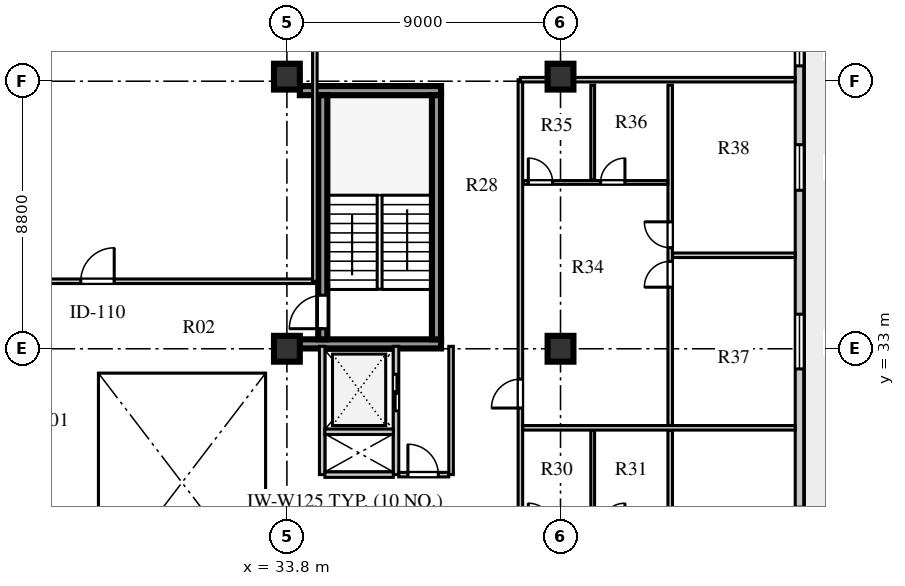
"""IFC4 building model, lengths in metres.
Left out: names, types, materials, properties, quantities, classifications, styles, units other than length and angle.
Written with IfcOpenShell. Run it as: python <this file> out.ifc"""

import sys

from ifc_helpers import new_model, si_unit, direction, frame, frame_2d, origin, origin_2d, place, context, subcontext, project, spatial, rectangle, extrude, element, fill, save


model = new_model("IFC4")
c1 = context("Model", 3, precision=1e-05, world=origin(), true_north=direction((0.0, 1.0)))
c2 = subcontext(c1, "Body", "Model", "MODEL_VIEW")
j1 = project(units=[si_unit("LENGTHUNIT", "METRE"), si_unit("PLANEANGLEUNIT", "RADIAN")], contexts=[c1])
p1 = place(None, origin())
s1 = spatial("IfcSite", under=j1, at=p1, CompositionType="ELEMENT")
p2 = place(p1, origin())
s2 = spatial("IfcBuilding", under=s1, at=p2, CompositionType="ELEMENT")
p3 = place(p2, frame((0.0, 0.0, 237.5)))
s3 = spatial("IfcBuildingStorey", under=s2, at=p3, CompositionType="ELEMENT", Elevation=237.5)
for number, where, z_axis, x_axis in (
    (1, (34.225, 33.16, 0.0), (0.0, 0.0, 1.0), (1.0, 0.0, 0.0)),
    (2, (34.225, 41.49, 0.0), (0.0, 0.0, 1.0), (1.0, 0.0, 0.0)),
):
    element("IfcWall", number, at=place(p3, frame(where, z_axis=z_axis, x_axis=x_axis)), inside=s3, PredefinedType="SHEAR", context=c2, shape_type="SweptSolid", body=[
        extrude(rectangle(XDim=4.645, YDim=0.3, at=frame_2d((2.323, 0.0))), origin(), (0.0, 0.0, 1.0), 3.66),
    ])
p4 = place(p3, frame((34.98, 33.31, 0.0), z_axis=(0.0, 0.0, 1.0), x_axis=(0.0, 1.0, 0.0)))
e3 = element("IfcWall", 3, at=p4, inside=s3, PredefinedType="SHEAR", context=c2, shape_type="SweptSolid", body=[
    extrude(rectangle(XDim=8.03, YDim=0.3, at=frame_2d((4.015, 0.0))), origin(), (0.0, 0.0, 1.0), 3.66),
])
p5 = place(p4, frame((0.35, 0.0, 0.0)))
e4 = element("IfcOpeningElement", 4, at=p5, cuts=e3, PredefinedType="OPENING", context=c2, shape_type="SweptSolid", body=[
    extrude(rectangle(XDim=1.1, YDim=2.1, at=frame_2d((0.55, 1.05))), frame((0.0, 0.16, 0.0), z_axis=(0.0, -1.0, 0.0), x_axis=(1.0, 0.0, 0.0)), (0.0, 0.0, 1.0), 0.32),
])
p6 = place(p3, frame((38.72, 33.31, 0.0), z_axis=(0.0, 0.0, 1.0), x_axis=(0.0, 1.0, 0.0)))
e5 = element("IfcWall", 5, at=p6, inside=s3, PredefinedType="SHEAR", context=c2, shape_type="SweptSolid", body=[
    extrude(rectangle(XDim=8.03, YDim=0.3, at=frame_2d((4.015, 0.0))), origin(), (0.0, 0.0, 1.0), 3.66),
])
for number, where, z_axis, x_axis in (
    (6, (33.8, 33.0, 0.0), (0.0, 0.0, 1.0), (1.0, 0.0, 0.0)),
    (7, (33.8, 41.95, 0.0), (0.0, 0.0, 1.0), (1.0, 0.0, 0.0)),
    (8, (42.8, 33.0, 0.0), (0.0, 0.0, 1.0), (1.0, 0.0, 0.0)),
    (9, (42.8, 41.95, 0.0), (0.0, 0.0, 1.0), (1.0, 0.0, 0.0)),
):
    element("IfcColumn", number, at=place(p3, frame(where, z_axis=z_axis, x_axis=x_axis)), inside=s3, PredefinedType="COLUMN", context=c2, shape_type="SweptSolid", body=[
        extrude(rectangle(XDim=0.85, YDim=0.85, at=origin_2d()), origin(), (0.0, 0.0, 1.0), 3.66),
    ])
p7 = place(p3, frame((50.66, 13.13, 0.0), z_axis=(0.0, 0.0, 1.0), x_axis=(0.0, 1.0, 0.0)))
e10 = element("IfcWall", 10, at=p7, inside=s3, PredefinedType="STANDARD", context=c2, shape_type="SweptSolid", body=[
    extrude(rectangle(XDim=30.94, YDim=0.28, at=frame_2d((15.47, 0.0))), origin(), (0.0, 0.0, 1.0), 3.66),
])
p8 = place(p7, frame((0.67, 0.0, 0.0)))
e11 = element("IfcOpeningElement", 11, at=p8, cuts=e10, PredefinedType="OPENING", context=c2, shape_type="SweptSolid", body=[
    extrude(rectangle(XDim=1.0, YDim=2.05, at=frame_2d((0.5, 1.025))), frame((0.0, 0.15, 0.0), z_axis=(0.0, -1.0, 0.0), x_axis=(1.0, 0.0, 0.0)), (0.0, 0.0, 1.0), 0.3),
])
p9 = place(p7, frame((5.032, 0.0, 0.8)))
e12 = element("IfcOpeningElement", 12, at=p9, cuts=e10, PredefinedType="OPENING", context=c2, shape_type="SweptSolid", body=[
    extrude(rectangle(XDim=1.95, YDim=2.0, at=frame_2d((0.975, 1.0))), frame((0.0, 0.15, 0.0), z_axis=(0.0, -1.0, 0.0), x_axis=(1.0, 0.0, 0.0)), (0.0, 0.0, 1.0), 0.3),
])
p10 = place(p7, frame((12.408, 0.0, 0.8)))
e13 = element("IfcOpeningElement", 13, at=p10, cuts=e10, PredefinedType="OPENING", context=c2, shape_type="SweptSolid", body=[
    extrude(rectangle(XDim=2.25, YDim=2.0, at=frame_2d((1.125, 1.0))), frame((0.0, 0.15, 0.0), z_axis=(0.0, -1.0, 0.0), x_axis=(1.0, 0.0, 0.0)), (0.0, 0.0, 1.0), 0.3),
])
p11 = place(p7, frame((19.207, 0.0, 0.8)))
e14 = element("IfcOpeningElement", 14, at=p11, cuts=e10, PredefinedType="OPENING", context=c2, shape_type="SweptSolid", body=[
    extrude(rectangle(XDim=1.8, YDim=2.0, at=frame_2d((0.9, 1.0))), frame((0.0, 0.15, 0.0), z_axis=(0.0, -1.0, 0.0), x_axis=(1.0, 0.0, 0.0)), (0.0, 0.0, 1.0), 0.3),
])
p12 = place(p7, frame((25.082, 0.0, 0.8)))
e15 = element("IfcOpeningElement", 15, at=p12, cuts=e10, PredefinedType="OPENING", context=c2, shape_type="SweptSolid", body=[
    extrude(rectangle(XDim=1.5, YDim=2.0, at=frame_2d((0.75, 1.0))), frame((0.0, 0.15, 0.0), z_axis=(0.0, -1.0, 0.0), x_axis=(1.0, 0.0, 0.0)), (0.0, 0.0, 1.0), 0.3),
])
p13 = place(p7, frame((29.175, 0.0, 0.8)))
e16 = element("IfcOpeningElement", 16, at=p13, cuts=e10, PredefinedType="OPENING", context=c2, shape_type="SweptSolid", body=[
    extrude(rectangle(XDim=1.2, YDim=1.75, at=frame_2d((0.6, 0.875))), frame((0.0, 0.15, 0.0), z_axis=(0.0, -1.0, 0.0), x_axis=(1.0, 0.0, 0.0)), (0.0, 0.0, 1.0), 0.3),
])
p14 = place(p3, frame((34.96, 28.86, 0.0), z_axis=(0.0, 0.0, 1.0), x_axis=(0.0, 1.0, 0.0)))
e17 = element("IfcWall", 17, at=p14, inside=s3, PredefinedType="SOLIDWALL", context=c2, shape_type="SweptSolid", body=[
    extrude(rectangle(XDim=4.22, YDim=0.18, at=frame_2d((2.11, 0.0))), origin(), (0.0, 0.0, 1.0), 3.66),
])
p15 = place(p3, frame((37.39, 28.86, 0.0), z_axis=(0.0, 0.0, 1.0), x_axis=(0.0, 1.0, 0.0)))
e18 = element("IfcWall", 18, at=p15, inside=s3, PredefinedType="SOLIDWALL", context=c2, shape_type="SweptSolid", body=[
    extrude(rectangle(XDim=4.22, YDim=0.18, at=frame_2d((2.11, 0.0))), origin(), (0.0, 0.0, 1.0), 3.66),
])
p16 = place(p15, frame((2.1, 0.0, 0.0)))
e19 = element("IfcOpeningElement", 19, at=p16, cuts=e18, PredefinedType="OPENING", context=c2, shape_type="SweptSolid", body=[
    extrude(rectangle(XDim=1.2, YDim=2.12, at=frame_2d((0.6, 1.06))), frame((0.0, 0.1, 0.0), z_axis=(0.0, -1.0, 0.0), x_axis=(1.0, 0.0, 0.0)), (0.0, 0.0, 1.0), 0.2),
])
for number, where, z_axis, x_axis in (
    (20, (35.05, 28.86, 0.0), (0.0, 0.0, 1.0), (1.0, 0.0, 0.0)),
    (21, (35.05, 30.27, 0.0), (0.0, 0.0, 1.0), (1.0, 0.0, 0.0)),
):
    element("IfcWall", number, at=place(p3, frame(where, z_axis=z_axis, x_axis=x_axis)), inside=s3, PredefinedType="SOLIDWALL", context=c2, shape_type="SweptSolid", body=[
        extrude(rectangle(XDim=2.25, YDim=0.18, at=frame_2d((1.125, 0.0))), origin(), (0.0, 0.0, 1.0), 3.66),
    ])
p17 = place(p3, frame((39.2, 28.86, 0.0), z_axis=(0.0, 0.0, 1.0), x_axis=(0.0, 1.0, 0.0)))
e22 = element("IfcWall", 22, at=p17, inside=s3, PredefinedType="PARTITIONING", context=c2, shape_type="SweptSolid", body=[
    extrude(rectangle(XDim=4.22, YDim=0.15, at=frame_2d((2.11, 0.0))), origin(), (0.0, 0.0, 1.0), 3.66),
])
p18 = place(p3, frame((37.48, 28.86, 0.0), z_axis=(0.0, 0.0, 1.0), x_axis=(1.0, 0.0, 0.0)))
e23 = element("IfcWall", 23, at=p18, inside=s3, PredefinedType="PARTITIONING", context=c2, shape_type="SweptSolid", body=[
    extrude(rectangle(XDim=1.64, YDim=0.15, at=frame_2d((0.82, 0.0))), origin(), (0.0, 0.0, 1.0), 3.66),
])
p19 = place(p18, frame((0.3, 0.0, 0.0)))
e24 = element("IfcOpeningElement", 24, at=p19, cuts=e23, PredefinedType="OPENING", context=c2, shape_type="SweptSolid", body=[
    extrude(rectangle(XDim=1.0, YDim=2.1, at=frame_2d((0.5, 1.05))), frame((0.0, 0.085, 0.0), z_axis=(0.0, -1.0, 0.0), x_axis=(1.0, 0.0, 0.0)), (0.0, 0.0, 1.0), 0.17),
])
p20 = place(p3, frame((25.22, 35.22, 0.0), z_axis=(0.0, 0.0, 1.0), x_axis=(1.0, 0.0, 0.0)))
e25 = element("IfcWall", 25, at=p20, inside=s3, PredefinedType="PARTITIONING", context=c2, shape_type="SweptSolid", body=[
    extrude(rectangle(XDim=9.5, YDim=0.15, at=frame_2d((4.75, 0.0))), origin(), (0.0, 0.0, 1.0), 3.66),
])
p21 = place(p20, frame((1.8, 0.0, 0.0)))
e26 = element("IfcOpeningElement", 26, at=p21, cuts=e25, PredefinedType="OPENING", context=c2, shape_type="SweptSolid", body=[
    extrude(rectangle(XDim=1.1, YDim=2.08, at=frame_2d((0.55, 1.04))), frame((0.0, 0.085, 0.0), z_axis=(0.0, -1.0, 0.0), x_axis=(1.0, 0.0, 0.0)), (0.0, 0.0, 1.0), 0.17),
])
p22 = place(p3, frame((34.72, 35.22, 0.0), z_axis=(0.0, 0.0, 1.0), x_axis=(0.0, 1.0, 0.0)))
e27 = element("IfcWall", 27, at=p22, inside=s3, PredefinedType="PARTITIONING", context=c2, shape_type="SweptSolid", body=[
    extrude(rectangle(XDim=14.1, YDim=0.15, at=frame_2d((7.05, 0.0))), origin(), (0.0, 0.0, 1.0), 3.66),
])
p23 = place(p3, frame((41.48, 15.35, 0.0), z_axis=(0.0, 0.0, 1.0), x_axis=(0.0, 1.0, 0.0)))
e28 = element("IfcWall", 28, at=p23, inside=s3, PredefinedType="PARTITIONING", context=c2, shape_type="SweptSolid", body=[
    extrude(rectangle(XDim=26.5, YDim=0.15, at=frame_2d((13.25, 0.0))), origin(), (0.0, 0.0, 1.0), 3.66),
])
p24 = place(p23, frame((0.75, 0.0, 0.0)))
e29 = element("IfcOpeningElement", 29, at=p24, cuts=e28, PredefinedType="OPENING", context=c2, shape_type="SweptSolid", body=[
    extrude(rectangle(XDim=0.95, YDim=2.1, at=frame_2d((0.475, 1.05))), frame((0.0, 0.085, 0.0), z_axis=(0.0, -1.0, 0.0), x_axis=(1.0, 0.0, 0.0)), (0.0, 0.0, 1.0), 0.17),
])
p25 = place(p23, frame((15.7, 0.0, 0.0)))
e30 = element("IfcOpeningElement", 30, at=p25, cuts=e28, PredefinedType="OPENING", context=c2, shape_type="SweptSolid", body=[
    extrude(rectangle(XDim=0.95, YDim=2.1, at=frame_2d((0.475, 1.05))), frame((0.0, 0.085, 0.0), z_axis=(0.0, -1.0, 0.0), x_axis=(1.0, 0.0, 0.0)), (0.0, 0.0, 1.0), 0.17),
])
p26 = place(p3, frame((41.48, 41.85, 0.0), z_axis=(0.0, 0.0, 1.0), x_axis=(1.0, 0.0, 0.0)))
e31 = element("IfcWall", 31, at=p26, inside=s3, PredefinedType="PARTITIONING", context=c2, shape_type="SweptSolid", body=[
    extrude(rectangle(XDim=9.04, YDim=0.15, at=frame_2d((4.52, 0.0))), origin(), (0.0, 0.0, 1.0), 3.06),
])
p27 = place(p3, frame((46.408, 15.53, 0.0), z_axis=(0.0, 0.0, 1.0), x_axis=(0.0, 1.0, 0.0)))
e32 = element("IfcWall", 32, at=p27, inside=s3, PredefinedType="PARTITIONING", context=c2, shape_type="SweptSolid", body=[
    extrude(rectangle(XDim=14.79, YDim=0.15, at=frame_2d((7.395, 0.0))), origin(), (0.0, 0.0, 1.0), 3.66),
])
p28 = place(p27, frame((6.345, 0.0, 0.0)))
e33 = element("IfcOpeningElement", 33, at=p28, cuts=e32, PredefinedType="OPENING", context=c2, shape_type="SweptSolid", body=[
    extrude(rectangle(XDim=0.85, YDim=2.08, at=frame_2d((0.425, 1.04))), frame((0.0, 0.085, 0.0), z_axis=(0.0, -1.0, 0.0), x_axis=(1.0, 0.0, 0.0)), (0.0, 0.0, 1.0), 0.17),
])
p29 = place(p27, frame((7.645, 0.0, 0.0)))
e34 = element("IfcOpeningElement", 34, at=p29, cuts=e32, PredefinedType="OPENING", context=c2, shape_type="SweptSolid", body=[
    extrude(rectangle(XDim=0.85, YDim=2.08, at=frame_2d((0.425, 1.04))), frame((0.0, 0.085, 0.0), z_axis=(0.0, -1.0, 0.0), x_axis=(1.0, 0.0, 0.0)), (0.0, 0.0, 1.0), 0.17),
])
p30 = place(p3, frame((43.859, 27.2, 0.0), z_axis=(0.0, 0.0, 1.0), x_axis=(0.0, 1.0, 0.0)))
e35 = element("IfcWall", 35, at=p30, inside=s3, PredefinedType="PLUMBINGWALL", context=c2, shape_type="SweptSolid", body=[
    extrude(rectangle(XDim=3.12, YDim=0.125, at=frame_2d((1.56, 0.0))), origin(), (0.0, 0.0, 1.0), 3.66),
])
p31 = place(p3, frame((41.56, 30.4, 0.0), z_axis=(0.0, 0.0, 1.0), x_axis=(1.0, 0.0, 0.0)))
e36 = element("IfcWall", 36, at=p31, inside=s3, PredefinedType="PARTITIONING", context=c2, shape_type="SweptSolid", body=[
    extrude(rectangle(XDim=8.96, YDim=0.15, at=frame_2d((4.48, 0.0))), origin(), (0.0, 0.0, 1.0), 3.66),
])
p32 = place(p3, frame((46.408, 30.48, 0.0), z_axis=(0.0, 0.0, 1.0), x_axis=(0.0, 1.0, 0.0)))
e37 = element("IfcWall", 37, at=p32, inside=s3, PredefinedType="PARTITIONING", context=c2, shape_type="SweptSolid", body=[
    extrude(rectangle(XDim=11.19, YDim=0.15, at=frame_2d((5.595, 0.0))), origin(), (0.0, 0.0, 1.0), 3.66),
])
p33 = place(p32, frame((4.545, 0.0, 0.0)))
e38 = element("IfcOpeningElement", 38, at=p33, cuts=e37, PredefinedType="OPENING", context=c2, shape_type="SweptSolid", body=[
    extrude(rectangle(XDim=0.85, YDim=2.08, at=frame_2d((0.425, 1.04))), frame((0.0, 0.085, 0.0), z_axis=(0.0, -1.0, 0.0), x_axis=(1.0, 0.0, 0.0)), (0.0, 0.0, 1.0), 0.17),
])
p34 = place(p32, frame((5.845, 0.0, 0.0)))
e39 = element("IfcOpeningElement", 39, at=p34, cuts=e37, PredefinedType="OPENING", context=c2, shape_type="SweptSolid", body=[
    extrude(rectangle(XDim=0.85, YDim=2.08, at=frame_2d((0.425, 1.04))), frame((0.0, 0.085, 0.0), z_axis=(0.0, -1.0, 0.0), x_axis=(1.0, 0.0, 0.0)), (0.0, 0.0, 1.0), 0.17),
])
p35 = place(p3, frame((41.58, 38.47, 0.0), z_axis=(0.0, 0.0, 1.0), x_axis=(1.0, 0.0, 0.0)))
e40 = element("IfcWall", 40, at=p35, inside=s3, PredefinedType="PLUMBINGWALL", context=c2, shape_type="SweptSolid", body=[
    extrude(rectangle(XDim=4.748, YDim=0.125, at=frame_2d((2.374, 0.0))), origin(), (0.0, 0.0, 1.0), 3.66),
])
p36 = place(p35, frame((0.16, 0.0, 0.0)))
e41 = element("IfcOpeningElement", 41, at=p36, cuts=e40, PredefinedType="OPENING", context=c2, shape_type="SweptSolid", body=[
    extrude(rectangle(XDim=0.8, YDim=2.05, at=frame_2d((0.4, 1.025))), frame((0.0, 0.073, 0.0), z_axis=(0.0, -1.0, 0.0), x_axis=(1.0, 0.0, 0.0)), (0.0, 0.0, 1.0), 0.145),
])
p37 = place(p35, frame((2.539, 0.0, 0.0)))
e42 = element("IfcOpeningElement", 42, at=p37, cuts=e40, PredefinedType="OPENING", context=c2, shape_type="SweptSolid", body=[
    extrude(rectangle(XDim=0.8, YDim=2.05, at=frame_2d((0.4, 1.025))), frame((0.0, 0.073, 0.0), z_axis=(0.0, -1.0, 0.0), x_axis=(1.0, 0.0, 0.0)), (0.0, 0.0, 1.0), 0.145),
])
p38 = place(p3, frame((43.859, 38.55, 0.0), z_axis=(0.0, 0.0, 1.0), x_axis=(0.0, 1.0, 0.0)))
e43 = element("IfcWall", 43, at=p38, inside=s3, PredefinedType="PLUMBINGWALL", context=c2, shape_type="SweptSolid", body=[
    extrude(rectangle(XDim=3.12, YDim=0.125, at=frame_2d((1.56, 0.0))), origin(), (0.0, 0.0, 1.0), 3.66),
])
p39 = place(p3, frame((46.488, 36.075, 0.0), z_axis=(0.0, 0.0, 1.0), x_axis=(1.0, 0.0, 0.0)))
e44 = element("IfcWall", 44, at=p39, inside=s3, PredefinedType="PARTITIONING", context=c2, shape_type="SweptSolid", body=[
    extrude(rectangle(XDim=4.032, YDim=0.15, at=frame_2d((2.016, 0.0))), origin(), (0.0, 0.0, 1.0), 3.66),
])
p40 = place(p11, origin())
e45 = element("IfcWindow", 45, at=p40, inside=s3, PartitioningType="SINGLE_PANEL", PredefinedType="WINDOW", context=c2, shape_type="SweptSolid", body=[
    extrude(rectangle(XDim=1.8, YDim=2.0, at=frame_2d((0.9, 1.0))), frame((0.0, 0.03, 0.0), z_axis=(0.0, -1.0, 0.0), x_axis=(1.0, 0.0, 0.0)), (0.0, 0.0, 1.0), 0.06),
])
fill(e14, e45)
p41 = place(p12, origin())
e46 = element("IfcWindow", 46, at=p41, inside=s3, PartitioningType="SINGLE_PANEL", PredefinedType="WINDOW", context=c2, shape_type="SweptSolid", body=[
    extrude(rectangle(XDim=1.5, YDim=2.0, at=frame_2d((0.75, 1.0))), frame((0.0, 0.03, 0.0), z_axis=(0.0, -1.0, 0.0), x_axis=(1.0, 0.0, 0.0)), (0.0, 0.0, 1.0), 0.06),
])
fill(e15, e46)
p42 = place(p13, origin())
e47 = element("IfcWindow", 47, at=p42, inside=s3, PartitioningType="SINGLE_PANEL", PredefinedType="WINDOW", context=c2, shape_type="SweptSolid", body=[
    extrude(rectangle(XDim=1.2, YDim=1.75, at=frame_2d((0.6, 0.875))), frame((0.0, 0.03, 0.0), z_axis=(0.0, -1.0, 0.0), x_axis=(1.0, 0.0, 0.0)), (0.0, 0.0, 1.0), 0.06),
])
fill(e16, e47)
p43 = place(p5, origin())
e48 = element("IfcDoor", 48, at=p43, inside=s3, OperationType="SINGLE_SWING_LEFT", PredefinedType="DOOR", context=c2, shape_type="SweptSolid", body=[
    extrude(rectangle(XDim=1.1, YDim=2.1, at=frame_2d((0.55, 1.05))), frame((0.0, 0.025, 0.0), z_axis=(0.0, -1.0, 0.0), x_axis=(1.0, 0.0, 0.0)), (0.0, 0.0, 1.0), 0.05),
])
fill(e4, e48)
p44 = place(p16, frame((1.2, 0.0, 0.0), z_axis=(0.0, 0.0, 1.0), x_axis=(-1.0, 0.0, 0.0)))
e49 = element("IfcDoor", 49, at=p44, inside=s3, OperationType="DOUBLE_DOOR_SLIDING", PredefinedType="DOOR", context=c2, shape_type="SweptSolid", body=[
    extrude(rectangle(XDim=1.2, YDim=2.12, at=frame_2d((0.6, 1.06))), frame((0.0, 0.025, 0.0), z_axis=(0.0, -1.0, 0.0), x_axis=(1.0, 0.0, 0.0)), (0.0, 0.0, 1.0), 0.05),
])
fill(e19, e49)
p45 = place(p19, origin())
e50 = element("IfcDoor", 50, at=p45, inside=s3, OperationType="SINGLE_SWING_LEFT", PredefinedType="DOOR", context=c2, shape_type="SweptSolid", body=[
    extrude(rectangle(XDim=1.0, YDim=2.1, at=frame_2d((0.5, 1.05))), frame((0.0, 0.025, 0.0), z_axis=(0.0, -1.0, 0.0), x_axis=(1.0, 0.0, 0.0)), (0.0, 0.0, 1.0), 0.05),
])
fill(e24, e50)
p46 = place(p21, origin())
e51 = element("IfcDoor", 51, at=p46, inside=s3, OperationType="SINGLE_SWING_RIGHT", PredefinedType="DOOR", context=c2, shape_type="SweptSolid", body=[
    extrude(rectangle(XDim=1.1, YDim=2.08, at=frame_2d((0.55, 1.04))), frame((0.0, 0.025, 0.0), z_axis=(0.0, -1.0, 0.0), x_axis=(1.0, 0.0, 0.0)), (0.0, 0.0, 1.0), 0.05),
])
fill(e26, e51)
p47 = place(p36, origin())
e52 = element("IfcDoor", 52, at=p47, inside=s3, OperationType="SINGLE_SWING_LEFT", PredefinedType="DOOR", context=c2, shape_type="SweptSolid", body=[
    extrude(rectangle(XDim=0.8, YDim=2.05, at=frame_2d((0.4, 1.025))), frame((0.0, 0.025, 0.0), z_axis=(0.0, -1.0, 0.0), x_axis=(1.0, 0.0, 0.0)), (0.0, 0.0, 1.0), 0.05),
])
fill(e41, e52)
p48 = place(p37, origin())
e53 = element("IfcDoor", 53, at=p48, inside=s3, OperationType="SINGLE_SWING_RIGHT", PredefinedType="DOOR", context=c2, shape_type="SweptSolid", body=[
    extrude(rectangle(XDim=0.8, YDim=2.05, at=frame_2d((0.4, 1.025))), frame((0.0, 0.025, 0.0), z_axis=(0.0, -1.0, 0.0), x_axis=(1.0, 0.0, 0.0)), (0.0, 0.0, 1.0), 0.05),
])
fill(e42, e53)
p49 = place(p33, origin())
e54 = element("IfcDoor", 54, at=p49, inside=s3, OperationType="SINGLE_SWING_LEFT", PredefinedType="DOOR", context=c2, shape_type="SweptSolid", body=[
    extrude(rectangle(XDim=0.85, YDim=2.08, at=frame_2d((0.425, 1.04))), frame((0.0, 0.025, 0.0), z_axis=(0.0, -1.0, 0.0), x_axis=(1.0, 0.0, 0.0)), (0.0, 0.0, 1.0), 0.05),
])
fill(e38, e54)
p50 = place(p34, origin())
e55 = element("IfcDoor", 55, at=p50, inside=s3, OperationType="SINGLE_SWING_RIGHT", PredefinedType="DOOR", context=c2, shape_type="SweptSolid", body=[
    extrude(rectangle(XDim=0.85, YDim=2.08, at=frame_2d((0.425, 1.04))), frame((0.0, 0.025, 0.0), z_axis=(0.0, -1.0, 0.0), x_axis=(1.0, 0.0, 0.0)), (0.0, 0.0, 1.0), 0.05),
])
fill(e39, e55)
p51 = place(p25, origin())
e56 = element("IfcDoor", 56, at=p51, inside=s3, OperationType="SINGLE_SWING_LEFT", PredefinedType="DOOR", context=c2, shape_type="SweptSolid", body=[
    extrude(rectangle(XDim=0.95, YDim=2.1, at=frame_2d((0.475, 1.05))), frame((0.0, 0.025, 0.0), z_axis=(0.0, -1.0, 0.0), x_axis=(1.0, 0.0, 0.0)), (0.0, 0.0, 1.0), 0.05),
])
fill(e30, e56)
save(model, sys.argv[1])
